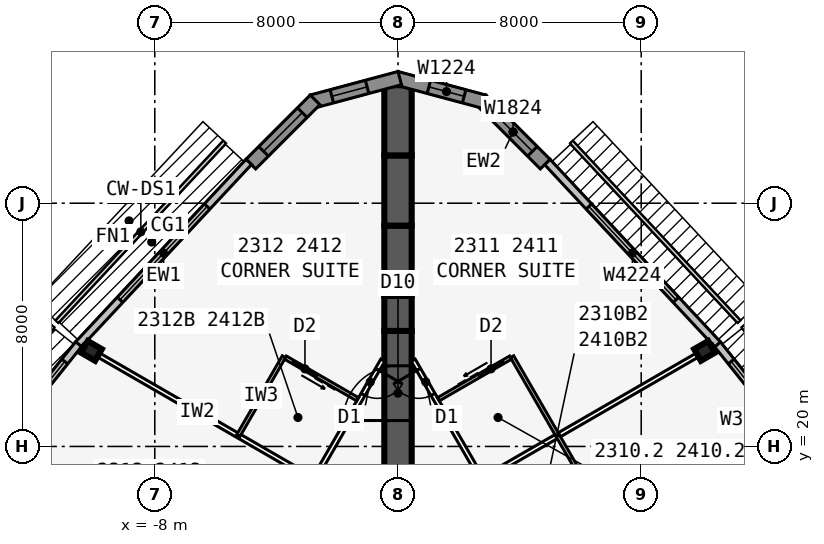
"""IFC4 building model, lengths in metres.
Left out: names, types, materials, properties, quantities, classifications, styles, units other than length and angle.
Written with IfcOpenShell. Run it as: python <this file> out.ifc"""

import sys

from ifc_helpers import new_model, si_unit, direction, frame, frame_2d, origin, origin_2d, place, context, subcontext, project, spatial, polyline, rectangle, i_section, outline, extrude, element, fill, save


model = new_model("IFC4")
c1 = context("Model", 3, precision=1e-05, world=origin(), true_north=direction((0.0, 1.0)))
c2 = subcontext(c1, "Body", "Model", "MODEL_VIEW")
j1 = project(units=[si_unit("LENGTHUNIT", "METRE"), si_unit("PLANEANGLEUNIT", "RADIAN")], contexts=[c1])
p1 = place(None, origin())
s1 = spatial("IfcSite", under=j1, at=p1, CompositionType="ELEMENT")
p2 = place(p1, origin())
s2 = spatial("IfcBuilding", under=s1, at=p2, CompositionType="ELEMENT")
p3 = place(p2, frame((0.0, 0.0, 89.7)))
s3 = spatial("IfcBuildingStorey", under=s2, at=p3, CompositionType="ELEMENT", Elevation=89.7)
p4 = place(p3, frame((0.0, 19.052, 0.0), z_axis=(0.0, 0.0, 1.0), x_axis=(0.0, 1.0, 0.0)))
e1 = element("IfcWall", 1, at=p4, inside=s3, PredefinedType="SHEAR", context=c2, shape_type="SweptSolid", body=[
    extrude(rectangle(XDim=4.746, YDim=0.9, at=frame_2d((2.373, 0.0))), origin(), (0.0, 0.0, 1.0), 3.4),
])
p5 = place(p4, frame((1.8, 0.0, 0.0)))
e2 = element("IfcOpeningElement", 2, at=p5, cuts=e1, PredefinedType="OPENING", context=c2, shape_type="SweptSolid", body=[
    extrude(rectangle(XDim=1.8, YDim=2.13, at=frame_2d((0.9, 1.065))), frame((0.0, 0.46, 0.0), z_axis=(0.0, -1.0, 0.0), x_axis=(1.0, 0.0, 0.0)), (0.0, 0.0, 1.0), 0.92),
])
p6 = place(p3, frame((0.0, 23.799, 0.0), z_axis=(0.0, 0.0, 1.0), x_axis=(0.0, 1.0, 0.0)))
e3 = element("IfcWall", 3, at=p6, inside=s3, PredefinedType="SHEAR", context=c2, shape_type="SweptSolid", body=[
    extrude(rectangle(XDim=1.155, YDim=0.9, at=frame_2d((0.577, 0.0))), origin(), (0.0, 0.0, 1.0), 3.4),
])
p7 = place(p3, frame((0.0, 24.953, 0.0), z_axis=(0.0, 0.0, 1.0), x_axis=(0.0, 1.0, 0.0)))
e4 = element("IfcWall", 4, at=p7, inside=s3, PredefinedType="SHEAR", context=c2, shape_type="SweptSolid", body=[
    extrude(rectangle(XDim=2.309, YDim=0.9, at=frame_2d((1.155, 0.0))), origin(), (0.0, 0.0, 1.0), 3.4),
])
p8 = place(p3, frame((0.0, 27.263, 0.0), z_axis=(0.0, 0.0, 1.0), x_axis=(0.0, 1.0, 0.0)))
e5 = element("IfcWall", 5, at=p8, inside=s3, PredefinedType="SHEAR", context=c2, shape_type="SweptSolid", body=[
    extrude(rectangle(XDim=2.31, YDim=0.9, at=frame_2d((1.155, 0.0))), origin(), (0.0, 0.0, 1.0), 3.4),
])
p9 = place(p3, frame((0.0, 29.572, 0.0), z_axis=(0.0, 0.0, 1.0), x_axis=(0.0, 1.0, 0.0)))
e6 = element("IfcWall", 6, at=p9, inside=s3, PredefinedType="SHEAR", context=c2, shape_type="SweptSolid", body=[
    extrude(rectangle(XDim=2.309, YDim=0.9, at=frame_2d((1.155, 0.0))), origin(), (0.0, 0.0, 1.0), 3.4),
])
for number, where, z_axis, x_axis in (
    (7, (10.083, 23.142, 0.0), (0.0, 0.0, 1.0), (-0.5, 0.866, 0.0)),
    (8, (-10.083, 23.142, 0.0), (0.0, 0.0, 1.0), (-0.5, -0.866, 0.0)),
):
    element("IfcColumn", number, at=place(p3, frame(where, z_axis=z_axis, x_axis=x_axis)), inside=s3, PredefinedType="COLUMN", context=c2, shape_type="SweptSolid", body=[
        extrude(i_section(OverallWidth=0.442, OverallDepth=0.531, WebThickness=0.066, FlangeThickness=0.106, at=origin_2d()), origin(), (0.0, 0.0, 1.0), 3.4),
    ])
p10 = place(p3, frame((13.664, 19.414, 0.0), z_axis=(0.0, 0.0, 1.0), x_axis=(-0.624594965756, 0.780948864364, 0.0)))
e9 = element("IfcWall", 9, at=p10, inside=s3, PredefinedType="STANDARD", context=c2, shape_type="SweptSolid", body=[
    extrude(rectangle(XDim=5.058, YDim=0.25, at=frame_2d((2.529, 0.0))), origin(), (0.0, 0.0, 1.0), 3.235),
])
p11 = place(p10, frame((0.729, 0.0, 0.45)))
e10 = element("IfcOpeningElement", 10, at=p11, cuts=e9, PredefinedType="OPENING", context=c2, shape_type="SweptSolid", body=[
    extrude(rectangle(XDim=3.6, YDim=2.4, at=frame_2d((1.8, 1.2))), frame((0.0, 0.135, 0.0), z_axis=(0.0, -1.0, 0.0), x_axis=(1.0, 0.0, 0.0)), (0.0, 0.0, 1.0), 0.27),
])
p12 = place(p3, frame((10.511, 23.357, 0.0), z_axis=(0.0, 0.0, 1.0), x_axis=(-0.682289646561, 0.731081964075, 0.0)))
e11 = element("IfcWall", 11, at=p12, inside=s3, PredefinedType="STANDARD", context=c2, shape_type="SweptSolid", body=[
    extrude(rectangle(XDim=8.211, YDim=0.25, at=frame_2d((4.105, 0.0))), origin(), (0.0, 0.0, 1.0), 3.235),
])
p13 = place(p12, frame((2.006, 0.0, 0.45)))
e12 = element("IfcOpeningElement", 12, at=p13, cuts=e11, PredefinedType="OPENING", context=c2, shape_type="SweptSolid", body=[
    extrude(rectangle(XDim=4.2, YDim=2.4, at=frame_2d((2.1, 1.2))), frame((0.0, 0.135, 0.0), z_axis=(0.0, -1.0, 0.0), x_axis=(1.0, 0.0, 0.0)), (0.0, 0.0, 1.0), 0.27),
])
p14 = place(p3, frame((4.841, 29.286, 0.0), z_axis=(0.0, 0.0, 1.0), x_axis=(-0.707106781187, 0.707106781187, 0.0)))
e13 = element("IfcWall", 13, at=p14, inside=s3, PredefinedType="SOLIDWALL", context=c2, shape_type="SweptSolid", body=[
    extrude(rectangle(XDim=2.988, YDim=0.45, at=frame_2d((1.494, 0.0))), origin(), (0.0, 0.0, 1.0), 3.235),
])
p15 = place(p14, frame((0.594, 0.0, 0.45)))
e14 = element("IfcOpeningElement", 14, at=p15, cuts=e13, PredefinedType="OPENING", context=c2, shape_type="SweptSolid", body=[
    extrude(rectangle(XDim=1.8, YDim=2.4, at=frame_2d((0.9, 1.2))), frame((0.0, 0.235, 0.0), z_axis=(0.0, -1.0, 0.0), x_axis=(1.0, 0.0, 0.0)), (0.0, 0.0, 1.0), 0.47),
])
p16 = place(p3, frame((2.829, 31.341, 0.0), z_axis=(0.0, 0.0, 1.0), x_axis=(-0.965930548995, 0.258801419081, 0.0)))
e15 = element("IfcWall", 15, at=p16, inside=s3, PredefinedType="SOLIDWALL", context=c2, shape_type="SweptSolid", body=[
    extrude(outline(polyline([(2.989, 0.225), (2.929, 0.225), (2.438, 0.093), (2.402, 0.225), (0.0, 0.225), (0.0, -0.225), (2.989, -0.225), (2.989, 0.225)])), origin(), (0.0, 0.0, 1.0), 3.235),
])
p17 = place(p16, frame((0.676, 0.0, 0.45)))
e16 = element("IfcOpeningElement", 16, at=p17, cuts=e15, PredefinedType="OPENING", context=c2, shape_type="SweptSolid", body=[
    extrude(rectangle(XDim=1.2, YDim=2.4, at=frame_2d((0.6, 1.2))), frame((0.0, 0.235, 0.0), z_axis=(0.0, -1.0, 0.0), x_axis=(1.0, 0.0, 0.0)), (0.0, 0.0, 1.0), 0.47),
])
p18 = place(p3, frame((0.058, 32.114, 0.0), z_axis=(0.0, 0.0, 1.0), x_axis=(-0.965930548995, -0.258801419081, 0.0)))
e17 = element("IfcWall", 17, at=p18, inside=s3, PredefinedType="SOLIDWALL", context=c2, shape_type="SweptSolid", body=[
    extrude(outline(polyline([(2.989, 0.225), (0.586, 0.225), (0.551, 0.093), (0.059, 0.225), (0.0, 0.225), (0.0, -0.225), (2.989, -0.225), (2.989, 0.225)])), origin(), (0.0, 0.0, 1.0), 3.235),
])
p19 = place(p18, frame((1.113, 0.0, 0.45)))
e18 = element("IfcOpeningElement", 18, at=p19, cuts=e17, PredefinedType="OPENING", context=c2, shape_type="SweptSolid", body=[
    extrude(rectangle(XDim=1.2, YDim=2.4, at=frame_2d((0.6, 1.2))), frame((0.0, 0.235, 0.0), z_axis=(0.0, -1.0, 0.0), x_axis=(1.0, 0.0, 0.0)), (0.0, 0.0, 1.0), 0.47),
])
p20 = place(p3, frame((-2.728, 31.399, 0.0), z_axis=(0.0, 0.0, 1.0), x_axis=(-0.707106781187, -0.707106781187, 0.0)))
e19 = element("IfcWall", 19, at=p20, inside=s3, PredefinedType="SOLIDWALL", context=c2, shape_type="SweptSolid", body=[
    extrude(rectangle(XDim=2.988, YDim=0.45, at=frame_2d((1.494, 0.0))), origin(), (0.0, 0.0, 1.0), 3.235),
])
p21 = place(p20, frame((0.594, 0.0, 0.45)))
e20 = element("IfcOpeningElement", 20, at=p21, cuts=e19, PredefinedType="OPENING", context=c2, shape_type="SweptSolid", body=[
    extrude(rectangle(XDim=1.8, YDim=2.4, at=frame_2d((0.9, 1.2))), frame((0.0, 0.235, 0.0), z_axis=(0.0, -1.0, 0.0), x_axis=(1.0, 0.0, 0.0)), (0.0, 0.0, 1.0), 0.47),
])
p22 = place(p3, frame((-4.909, 29.36, 0.0), z_axis=(0.0, 0.0, 1.0), x_axis=(-0.682289646561, -0.731081964075, 0.0)))
e21 = element("IfcWall", 21, at=p22, inside=s3, PredefinedType="STANDARD", context=c2, shape_type="SweptSolid", body=[
    extrude(rectangle(XDim=8.211, YDim=0.25, at=frame_2d((4.105, 0.0))), origin(), (0.0, 0.0, 1.0), 3.235),
])
p23 = place(p22, frame((2.006, 0.0, 0.45)))
e22 = element("IfcOpeningElement", 22, at=p23, cuts=e21, PredefinedType="OPENING", context=c2, shape_type="SweptSolid", body=[
    extrude(rectangle(XDim=4.2, YDim=2.4, at=frame_2d((2.1, 1.2))), frame((0.0, 0.135, 0.0), z_axis=(0.0, -1.0, 0.0), x_axis=(1.0, 0.0, 0.0)), (0.0, 0.0, 1.0), 0.27),
])
p24 = place(p3, frame((-10.505, 23.364, 0.0), z_axis=(0.0, 0.0, 1.0), x_axis=(-0.624594965756, -0.780948864364, 0.0)))
e23 = element("IfcWall", 23, at=p24, inside=s3, PredefinedType="STANDARD", context=c2, shape_type="SweptSolid", body=[
    extrude(rectangle(XDim=5.058, YDim=0.25, at=frame_2d((2.529, 0.0))), origin(), (0.0, 0.0, 1.0), 3.235),
])
p25 = place(p24, frame((0.729, 0.0, 0.45)))
e24 = element("IfcOpeningElement", 24, at=p25, cuts=e23, PredefinedType="OPENING", context=c2, shape_type="SweptSolid", body=[
    extrude(rectangle(XDim=3.6, YDim=2.4, at=frame_2d((1.8, 1.2))), frame((0.0, 0.135, 0.0), z_axis=(0.0, -1.0, 0.0), x_axis=(1.0, 0.0, 0.0)), (0.0, 0.0, 1.0), 0.27),
])
p26 = place(p3, frame((20.027, -10.985, 0.0), z_axis=(0.0, 0.0, 1.0), x_axis=(-0.500001677587, 0.866024435227, 0.0)))
e25 = element("IfcWall", 25, at=p26, inside=s3, PredefinedType="PARTITIONING", context=c2, shape_type="SweptSolid", body=[
    extrude(rectangle(XDim=39.054, YDim=0.15, at=frame_2d((19.527, 0.0))), origin(), (0.0, 0.0, 1.0), 3.235),
])
p27 = place(p26, frame((0.352, 0.0, 0.0)))
e26 = element("IfcOpeningElement", 26, at=p27, cuts=e25, PredefinedType="OPENING", context=c2, shape_type="SweptSolid", body=[
    extrude(rectangle(XDim=0.95, YDim=2.13, at=frame_2d((0.475, 1.065))), frame((0.0, 0.085, 0.0), z_axis=(0.0, -1.0, 0.0), x_axis=(1.0, 0.0, 0.0)), (0.0, 0.0, 1.0), 0.17),
])
p28 = place(p26, frame((10.352, 0.0, 0.0)))
e27 = element("IfcOpeningElement", 27, at=p28, cuts=e25, PredefinedType="OPENING", context=c2, shape_type="SweptSolid", body=[
    extrude(rectangle(XDim=0.95, YDim=2.13, at=frame_2d((0.475, 1.065))), frame((0.0, 0.085, 0.0), z_axis=(0.0, -1.0, 0.0), x_axis=(1.0, 0.0, 0.0)), (0.0, 0.0, 1.0), 0.17),
])
p29 = place(p26, frame((17.752, 0.0, 0.0)))
e28 = element("IfcOpeningElement", 28, at=p29, cuts=e25, PredefinedType="OPENING", context=c2, shape_type="SweptSolid", body=[
    extrude(rectangle(XDim=0.95, YDim=2.13, at=frame_2d((0.475, 1.065))), frame((0.0, 0.085, 0.0), z_axis=(0.0, -1.0, 0.0), x_axis=(1.0, 0.0, 0.0)), (0.0, 0.0, 1.0), 0.17),
])
p30 = place(p26, frame((26.552, 0.0, 0.0)))
e29 = element("IfcOpeningElement", 29, at=p30, cuts=e25, PredefinedType="OPENING", context=c2, shape_type="SweptSolid", body=[
    extrude(rectangle(XDim=0.95, YDim=2.13, at=frame_2d((0.475, 1.065))), frame((0.0, 0.085, 0.0), z_axis=(0.0, -1.0, 0.0), x_axis=(1.0, 0.0, 0.0)), (0.0, 0.0, 1.0), 0.17),
])
p31 = place(p26, frame((37.752, 0.0, 0.0)))
e30 = element("IfcOpeningElement", 30, at=p31, cuts=e25, PredefinedType="OPENING", context=c2, shape_type="SweptSolid", body=[
    extrude(rectangle(XDim=0.95, YDim=2.13, at=frame_2d((0.475, 1.065))), frame((0.0, 0.085, 0.0), z_axis=(0.0, -1.0, 0.0), x_axis=(1.0, 0.0, 0.0)), (0.0, 0.0, 1.0), 0.17),
])
p32 = place(p3, frame((5.329, 14.623, 0.0), z_axis=(0.0, 0.0, 1.0), x_axis=(0.866018409083, 0.500012114982, 0.0)))
e31 = element("IfcWall", 31, at=p32, inside=s3, PredefinedType="PARTITIONING", context=c2, shape_type="SweptSolid", body=[
    extrude(rectangle(XDim=9.485, YDim=0.1, at=frame_2d((4.742, 0.0))), origin(), (0.0, 0.0, 1.0), 2.389),
])
p33 = place(p32, frame((0.45, 0.0, 0.0)))
e32 = element("IfcOpeningElement", 32, at=p33, cuts=e31, PredefinedType="OPENING", context=c2, shape_type="SweptSolid", body=[
    extrude(rectangle(XDim=0.9, YDim=2.13, at=frame_2d((0.45, 1.065))), frame((0.0, 0.06, 0.0), z_axis=(0.0, -1.0, 0.0), x_axis=(1.0, 0.0, 0.0)), (0.0, 0.0, 1.0), 0.12),
])
p34 = place(p3, frame((2.829, 18.954, 0.0), z_axis=(0.0, 0.0, 1.0), x_axis=(0.866020536561, 0.500008430184, 0.0)))
e33 = element("IfcWall", 33, at=p34, inside=s3, PredefinedType="PARTITIONING", context=c2, shape_type="SweptSolid", body=[
    extrude(rectangle(XDim=8.72, YDim=0.15, at=frame_2d((4.36, 0.0))), origin(), (0.0, 0.0, 1.0), 2.389),
])
for number, where, z_axis, x_axis in (
    (34, (6.753, 17.755, 0.0), (0.0, 0.0, 1.0), (-0.5, 0.866, 0.0)),
    (35, (5.253, 20.354, 0.0), (0.0, 0.0, 1.0), (-0.5, 0.866, 0.0)),
):
    element("IfcWall", number, at=place(p3, frame(where, z_axis=z_axis, x_axis=x_axis)), inside=s3, PredefinedType="PLUMBINGWALL", context=c2, shape_type="SweptSolid", body=[
        extrude(rectangle(XDim=3.0, YDim=0.12, at=frame_2d((1.5, 0.0))), origin(), (0.0, 0.0, 1.0), 3.235),
    ])
p35 = place(p3, frame((1.329, 21.552, 0.0), z_axis=(0.0, 0.0, 1.0), x_axis=(0.865997131366, 0.500048966069, 0.0)))
e36 = element("IfcWall", 36, at=p35, inside=s3, PredefinedType="PLUMBINGWALL", context=c2, shape_type="SweptSolid", body=[
    extrude(rectangle(XDim=2.74, YDim=0.12, at=frame_2d((1.37, 0.0))), origin(), (0.0, 0.0, 1.0), 3.235),
])
p36 = place(p35, frame((1.55, 0.0, 0.0)))
e37 = element("IfcOpeningElement", 37, at=p36, cuts=e36, PredefinedType="OPENING", context=c2, shape_type="SweptSolid", body=[
    extrude(rectangle(XDim=0.9, YDim=2.13, at=frame_2d((0.45, 1.065))), frame((0.0, 0.07, 0.0), z_axis=(0.0, -1.0, 0.0), x_axis=(1.0, 0.0, 0.0)), (0.0, 0.0, 1.0), 0.14),
])
p37 = place(p3, frame((-0.5, 22.836, 0.0), z_axis=(0.0, 0.0, 1.0), x_axis=(-0.500001677587, -0.866024435227, 0.0)))
e38 = element("IfcWall", 38, at=p37, inside=s3, PredefinedType="PARTITIONING", context=c2, shape_type="SweptSolid", body=[
    extrude(rectangle(XDim=39.054, YDim=0.15, at=frame_2d((19.527, 0.0))), origin(), (0.0, 0.0, 1.0), 3.235),
])
p38 = place(p37, frame((0.352, 0.0, 0.0)))
e39 = element("IfcOpeningElement", 39, at=p38, cuts=e38, PredefinedType="OPENING", context=c2, shape_type="SweptSolid", body=[
    extrude(rectangle(XDim=0.95, YDim=2.13, at=frame_2d((0.475, 1.065))), frame((0.0, 0.085, 0.0), z_axis=(0.0, -1.0, 0.0), x_axis=(1.0, 0.0, 0.0)), (0.0, 0.0, 1.0), 0.17),
])
p39 = place(p37, frame((6.552, 0.0, 0.0)))
e40 = element("IfcOpeningElement", 40, at=p39, cuts=e38, PredefinedType="OPENING", context=c2, shape_type="SweptSolid", body=[
    extrude(rectangle(XDim=0.95, YDim=2.13, at=frame_2d((0.475, 1.065))), frame((0.0, 0.085, 0.0), z_axis=(0.0, -1.0, 0.0), x_axis=(1.0, 0.0, 0.0)), (0.0, 0.0, 1.0), 0.17),
])
p40 = place(p37, frame((20.352, 0.0, 0.0)))
e41 = element("IfcOpeningElement", 41, at=p40, cuts=e38, PredefinedType="OPENING", context=c2, shape_type="SweptSolid", body=[
    extrude(rectangle(XDim=0.95, YDim=2.13, at=frame_2d((0.475, 1.065))), frame((0.0, 0.085, 0.0), z_axis=(0.0, -1.0, 0.0), x_axis=(1.0, 0.0, 0.0)), (0.0, 0.0, 1.0), 0.17),
])
p41 = place(p37, frame((27.752, 0.0, 0.0)))
e42 = element("IfcOpeningElement", 42, at=p41, cuts=e38, PredefinedType="OPENING", context=c2, shape_type="SweptSolid", body=[
    extrude(rectangle(XDim=0.95, YDim=2.13, at=frame_2d((0.475, 1.065))), frame((0.0, 0.085, 0.0), z_axis=(0.0, -1.0, 0.0), x_axis=(1.0, 0.0, 0.0)), (0.0, 0.0, 1.0), 0.17),
])
p42 = place(p37, frame((37.752, 0.0, 0.0)))
e43 = element("IfcOpeningElement", 43, at=p42, cuts=e38, PredefinedType="OPENING", context=c2, shape_type="SweptSolid", body=[
    extrude(rectangle(XDim=0.95, YDim=2.13, at=frame_2d((0.475, 1.065))), frame((0.0, 0.085, 0.0), z_axis=(0.0, -1.0, 0.0), x_axis=(1.0, 0.0, 0.0)), (0.0, 0.0, 1.0), 0.17),
])
p43 = place(p3, frame((-2.829, 18.954, 0.0), z_axis=(0.0, 0.0, 1.0), x_axis=(-0.866020536561, 0.500008430184, 0.0)))
e44 = element("IfcWall", 44, at=p43, inside=s3, PredefinedType="PARTITIONING", context=c2, shape_type="SweptSolid", body=[
    extrude(rectangle(XDim=8.72, YDim=0.15, at=frame_2d((4.36, 0.0))), origin(), (0.0, 0.0, 1.0), 2.389),
])
p44 = place(p3, frame((-5.329, 14.623, 0.0), z_axis=(0.0, 0.0, 1.0), x_axis=(-0.866018409083, 0.500012114982, 0.0)))
e45 = element("IfcWall", 45, at=p44, inside=s3, PredefinedType="PARTITIONING", context=c2, shape_type="SweptSolid", body=[
    extrude(rectangle(XDim=9.485, YDim=0.1, at=frame_2d((4.742, 0.0))), origin(), (0.0, 0.0, 1.0), 2.389),
])
p45 = place(p44, frame((0.45, 0.0, 0.0)))
e46 = element("IfcOpeningElement", 46, at=p45, cuts=e45, PredefinedType="OPENING", context=c2, shape_type="SweptSolid", body=[
    extrude(rectangle(XDim=0.9, YDim=2.13, at=frame_2d((0.45, 1.065))), frame((0.0, 0.06, 0.0), z_axis=(0.0, -1.0, 0.0), x_axis=(1.0, 0.0, 0.0)), (0.0, 0.0, 1.0), 0.12),
])
p46 = place(p3, frame((-3.753, 22.952, 0.0), z_axis=(0.0, 0.0, 1.0), x_axis=(-0.499990139034, -0.866031096941, 0.0)))
e47 = element("IfcWall", 47, at=p46, inside=s3, PredefinedType="PLUMBINGWALL", context=c2, shape_type="SweptSolid", body=[
    extrude(rectangle(XDim=3.0, YDim=0.12, at=frame_2d((1.5, 0.0))), origin(), (0.0, 0.0, 1.0), 3.235),
])
p47 = place(p3, frame((-1.329, 21.552, 0.0), z_axis=(0.0, 0.0, 1.0), x_axis=(-0.865997131366, 0.500048966069, 0.0)))
e48 = element("IfcWall", 48, at=p47, inside=s3, PredefinedType="PLUMBINGWALL", context=c2, shape_type="SweptSolid", body=[
    extrude(rectangle(XDim=2.74, YDim=0.12, at=frame_2d((1.37, 0.0))), origin(), (0.0, 0.0, 1.0), 3.235),
])
p48 = place(p47, frame((1.55, 0.0, 0.0)))
e49 = element("IfcOpeningElement", 49, at=p48, cuts=e48, PredefinedType="OPENING", context=c2, shape_type="SweptSolid", body=[
    extrude(rectangle(XDim=0.9, YDim=2.13, at=frame_2d((0.45, 1.065))), frame((0.0, 0.07, 0.0), z_axis=(0.0, -1.0, 0.0), x_axis=(1.0, 0.0, 0.0)), (0.0, 0.0, 1.0), 0.14),
])
p49 = place(p11, origin())
e50 = element("IfcWindow", 50, at=p49, inside=s3, PartitioningType="SINGLE_PANEL", PredefinedType="WINDOW", context=c2, shape_type="SweptSolid", body=[
    extrude(rectangle(XDim=3.6, YDim=2.4, at=frame_2d((1.8, 1.2))), frame((0.0, 0.03, 0.0), z_axis=(0.0, -1.0, 0.0), x_axis=(1.0, 0.0, 0.0)), (0.0, 0.0, 1.0), 0.06),
])
fill(e10, e50)
p50 = place(p13, origin())
e51 = element("IfcWindow", 51, at=p50, inside=s3, PartitioningType="SINGLE_PANEL", PredefinedType="WINDOW", context=c2, shape_type="SweptSolid", body=[
    extrude(rectangle(XDim=4.2, YDim=2.4, at=frame_2d((2.1, 1.2))), frame((0.0, 0.03, 0.0), z_axis=(0.0, -1.0, 0.0), x_axis=(1.0, 0.0, 0.0)), (0.0, 0.0, 1.0), 0.06),
])
fill(e12, e51)
p51 = place(p15, origin())
e52 = element("IfcWindow", 52, at=p51, inside=s3, PartitioningType="SINGLE_PANEL", PredefinedType="WINDOW", context=c2, shape_type="SweptSolid", body=[
    extrude(rectangle(XDim=1.8, YDim=2.4, at=frame_2d((0.9, 1.2))), frame((0.0, 0.03, 0.0), z_axis=(0.0, -1.0, 0.0), x_axis=(1.0, 0.0, 0.0)), (0.0, 0.0, 1.0), 0.06),
])
fill(e14, e52)
p52 = place(p17, origin())
e53 = element("IfcWindow", 53, at=p52, inside=s3, PartitioningType="SINGLE_PANEL", PredefinedType="WINDOW", context=c2, shape_type="SweptSolid", body=[
    extrude(rectangle(XDim=1.2, YDim=2.4, at=frame_2d((0.6, 1.2))), frame((0.0, 0.03, 0.0), z_axis=(0.0, -1.0, 0.0), x_axis=(1.0, 0.0, 0.0)), (0.0, 0.0, 1.0), 0.06),
])
fill(e16, e53)
p53 = place(p19, origin())
e54 = element("IfcWindow", 54, at=p53, inside=s3, PartitioningType="SINGLE_PANEL", PredefinedType="WINDOW", context=c2, shape_type="SweptSolid", body=[
    extrude(rectangle(XDim=1.2, YDim=2.4, at=frame_2d((0.6, 1.2))), frame((0.0, 0.03, 0.0), z_axis=(0.0, -1.0, 0.0), x_axis=(1.0, 0.0, 0.0)), (0.0, 0.0, 1.0), 0.06),
])
fill(e18, e54)
p54 = place(p21, origin())
e55 = element("IfcWindow", 55, at=p54, inside=s3, PartitioningType="SINGLE_PANEL", PredefinedType="WINDOW", context=c2, shape_type="SweptSolid", body=[
    extrude(rectangle(XDim=1.8, YDim=2.4, at=frame_2d((0.9, 1.2))), frame((0.0, 0.03, 0.0), z_axis=(0.0, -1.0, 0.0), x_axis=(1.0, 0.0, 0.0)), (0.0, 0.0, 1.0), 0.06),
])
fill(e20, e55)
p55 = place(p23, origin())
e56 = element("IfcWindow", 56, at=p55, inside=s3, PartitioningType="SINGLE_PANEL", PredefinedType="WINDOW", context=c2, shape_type="SweptSolid", body=[
    extrude(rectangle(XDim=4.2, YDim=2.4, at=frame_2d((2.1, 1.2))), frame((0.0, 0.03, 0.0), z_axis=(0.0, -1.0, 0.0), x_axis=(1.0, 0.0, 0.0)), (0.0, 0.0, 1.0), 0.06),
])
fill(e22, e56)
p56 = place(p25, origin())
e57 = element("IfcWindow", 57, at=p56, inside=s3, PartitioningType="SINGLE_PANEL", PredefinedType="WINDOW", context=c2, shape_type="SweptSolid", body=[
    extrude(rectangle(XDim=3.6, YDim=2.4, at=frame_2d((1.8, 1.2))), frame((0.0, 0.03, 0.0), z_axis=(0.0, -1.0, 0.0), x_axis=(1.0, 0.0, 0.0)), (0.0, 0.0, 1.0), 0.06),
])
fill(e24, e57)
p57 = place(p36, origin())
e58 = element("IfcDoor", 58, at=p57, inside=s3, OperationType="SLIDING_TO_LEFT", PredefinedType="DOOR", context=c2, shape_type="SweptSolid", body=[
    extrude(rectangle(XDim=0.9, YDim=2.13, at=frame_2d((0.45, 1.065))), frame((0.0, 0.025, 0.0), z_axis=(0.0, -1.0, 0.0), x_axis=(1.0, 0.0, 0.0)), (0.0, 0.0, 1.0), 0.05),
])
fill(e37, e58)
p58 = place(p31, origin())
e59 = element("IfcDoor", 59, at=p58, inside=s3, OperationType="SINGLE_SWING_RIGHT", PredefinedType="DOOR", context=c2, shape_type="SweptSolid", body=[
    extrude(rectangle(XDim=0.95, YDim=2.13, at=frame_2d((0.475, 1.065))), frame((0.0, 0.025, 0.0), z_axis=(0.0, -1.0, 0.0), x_axis=(1.0, 0.0, 0.0)), (0.0, 0.0, 1.0), 0.05),
])
fill(e30, e59)
p59 = place(p48, origin())
e60 = element("IfcDoor", 60, at=p59, inside=s3, OperationType="SLIDING_TO_LEFT", PredefinedType="DOOR", context=c2, shape_type="SweptSolid", body=[
    extrude(rectangle(XDim=0.9, YDim=2.13, at=frame_2d((0.45, 1.065))), frame((0.0, 0.025, 0.0), z_axis=(0.0, -1.0, 0.0), x_axis=(1.0, 0.0, 0.0)), (0.0, 0.0, 1.0), 0.05),
])
fill(e49, e60)
p60 = place(p38, origin())
e61 = element("IfcDoor", 61, at=p60, inside=s3, OperationType="SINGLE_SWING_LEFT", PredefinedType="DOOR", context=c2, shape_type="SweptSolid", body=[
    extrude(rectangle(XDim=0.95, YDim=2.13, at=frame_2d((0.475, 1.065))), frame((0.0, 0.025, 0.0), z_axis=(0.0, -1.0, 0.0), x_axis=(1.0, 0.0, 0.0)), (0.0, 0.0, 1.0), 0.05),
])
fill(e39, e61)
p61 = place(p5, origin())
e62 = element("IfcDoor", 62, at=p61, inside=s3, OperationType="DOUBLE_DOOR_DOUBLE_SWING", PredefinedType="DOOR", context=c2, shape_type="SweptSolid", body=[
    extrude(rectangle(XDim=1.8, YDim=2.13, at=frame_2d((0.9, 1.065))), frame((0.0, 0.025, 0.0), z_axis=(0.0, -1.0, 0.0), x_axis=(1.0, 0.0, 0.0)), (0.0, 0.0, 1.0), 0.05),
])
fill(e2, e62)
save(model, sys.argv[1])
